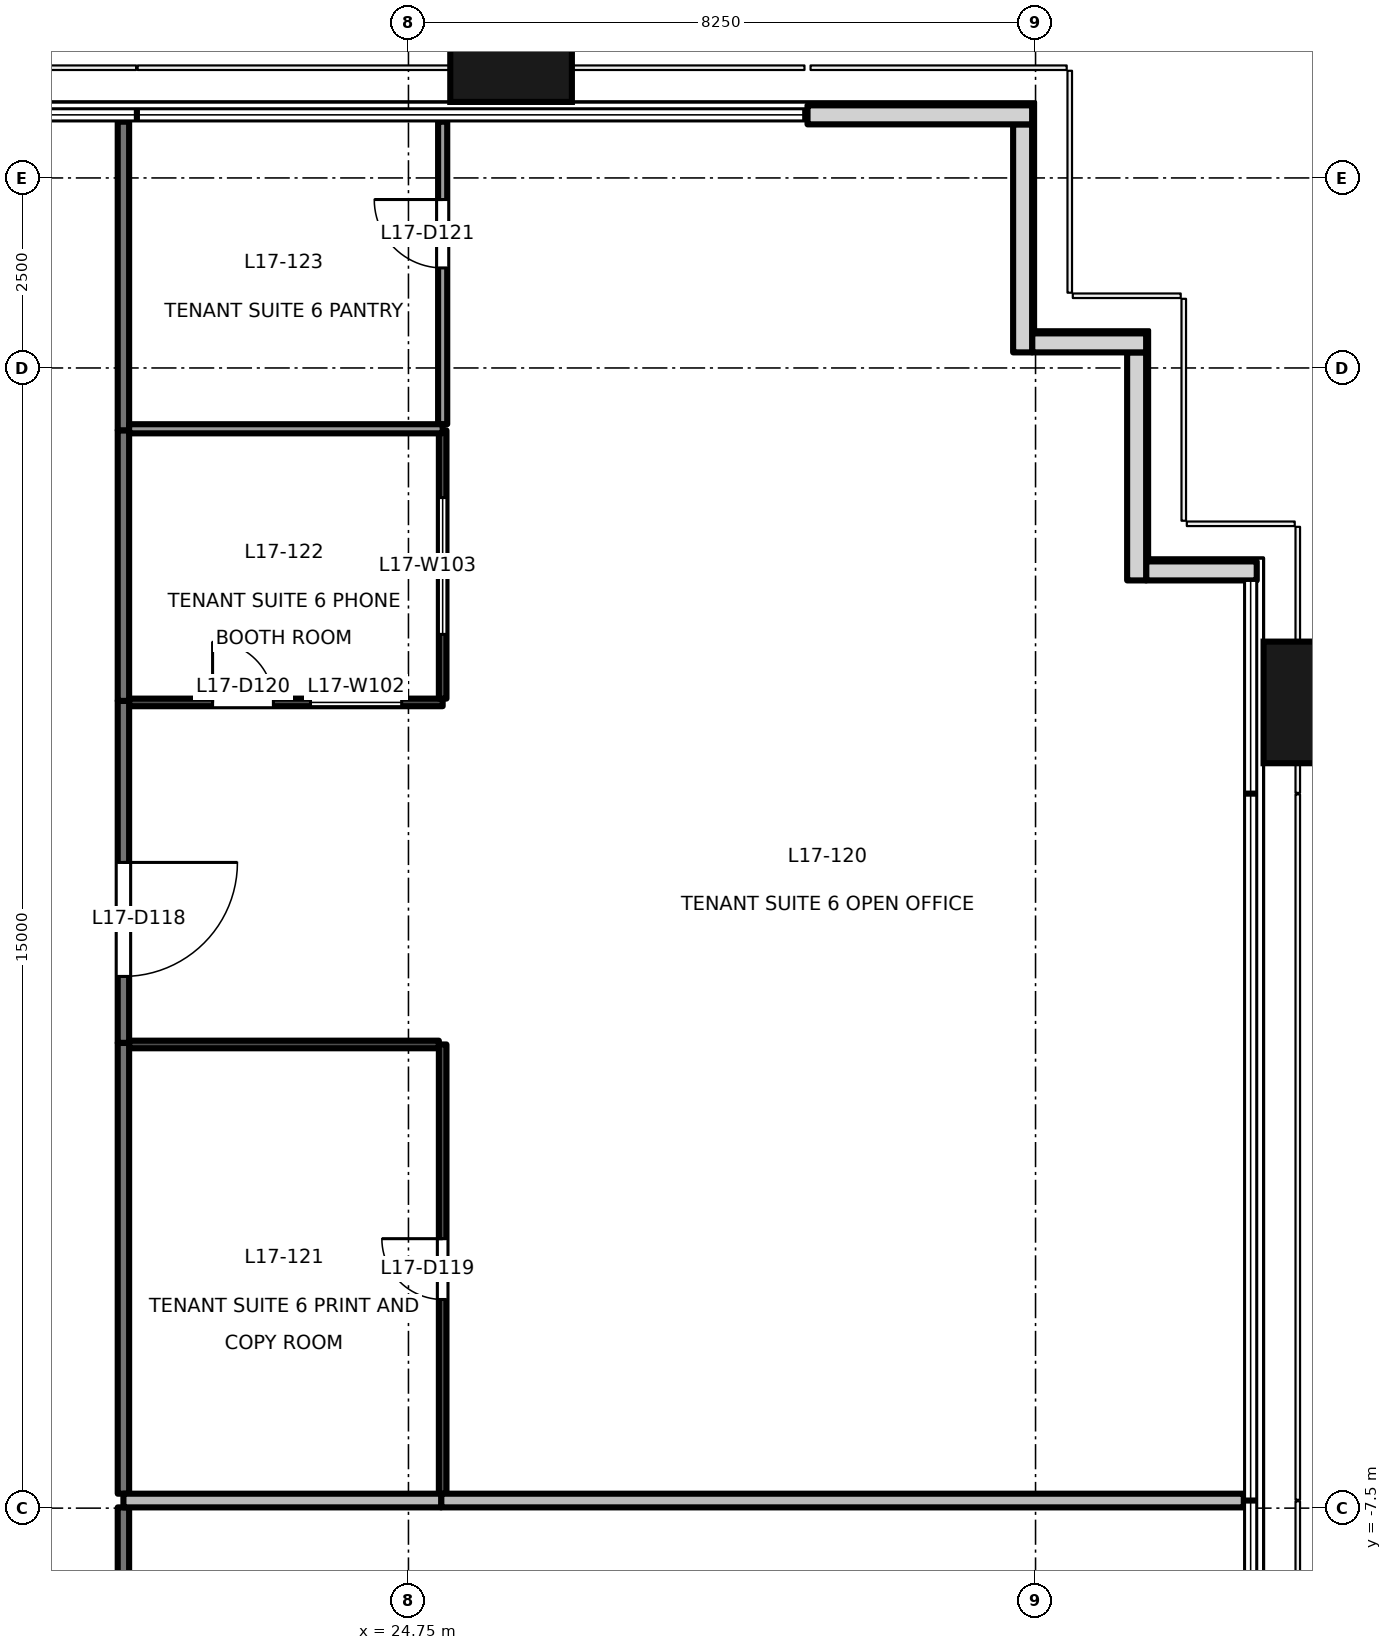
"""IFC4 building model, lengths in metres.
Left out: names, types, materials, properties, quantities, classifications, styles, units other than length and angle.
Written with IfcOpenShell. Run it as: python <this file> out.ifc"""

import sys

from ifc_helpers import new_model, si_unit, direction, frame, frame_2d, origin, origin_2d, place, context, subcontext, project, spatial, rectangle, extrude, element, fill, save


model = new_model("IFC4")
c1 = context("Model", 3, precision=1e-05, world=origin(), true_north=direction((0.0, 1.0)))
c2 = subcontext(c1, "Body", "Model", "MODEL_VIEW")
j1 = project(units=[si_unit("LENGTHUNIT", "METRE"), si_unit("PLANEANGLEUNIT", "RADIAN")], contexts=[c1])
p1 = place(None, origin())
s1 = spatial("IfcSite", under=j1, at=p1, CompositionType="ELEMENT")
p2 = place(p1, origin())
s2 = spatial("IfcBuilding", under=s1, at=p2, CompositionType="ELEMENT")
p3 = place(p2, frame((0.0, 0.0, 79.7)))
s3 = spatial("IfcBuildingStorey", under=s2, at=p3, CompositionType="ELEMENT", Elevation=79.7)
for number, where, z_axis, x_axis in (
    (1, (36.9, 3.1, -0.2), (0.0, 0.0, 1.0), (0.0, 1.0, 0.0)),
    (2, (26.1, 11.9, -0.2), (0.0, 0.0, 1.0), (1.0, 0.0, 0.0)),
):
    element("IfcColumn", number, at=place(p3, frame(where, z_axis=z_axis, x_axis=x_axis)), inside=s3, PredefinedType="COLUMN", context=c2, shape_type="SweptSolid", body=[
        extrude(rectangle(XDim=1.6, YDim=1.8, at=origin_2d()), origin(), (0.0, 0.0, 1.0), 4.0),
    ])
p4 = place(p3, frame((35.91, 4.83, 0.0), z_axis=(0.0, 0.0, 1.0), x_axis=(-1.0, 0.0, 0.0)))
e3 = element("IfcWall", 3, at=p4, inside=s3, PredefinedType="SOLIDWALL", context=c2, shape_type="SweptSolid", body=[
    extrude(rectangle(XDim=1.455, YDim=0.25, at=frame_2d((0.728, 0.0))), origin(), (0.0, 0.0, 1.0), 3.8),
])
p5 = place(p3, frame((34.33, 4.705, 0.0), z_axis=(0.0, 0.0, 1.0), x_axis=(0.0, 1.0, 0.0)))
e4 = element("IfcWall", 4, at=p5, inside=s3, PredefinedType="SOLIDWALL", context=c2, shape_type="SweptSolid", body=[
    extrude(rectangle(XDim=3.0, YDim=0.25, at=frame_2d((1.5, 0.0))), origin(), (0.0, 0.0, 1.0), 3.8),
])
p6 = place(p3, frame((34.455, 7.83, 0.0), z_axis=(0.0, 0.0, 1.0), x_axis=(-1.0, 0.0, 0.0)))
e5 = element("IfcWall", 5, at=p6, inside=s3, PredefinedType="SOLIDWALL", context=c2, shape_type="SweptSolid", body=[
    extrude(rectangle(XDim=1.5, YDim=0.25, at=frame_2d((0.75, 0.0))), origin(), (0.0, 0.0, 1.0), 3.8),
])
p7 = place(p3, frame((32.83, 7.705, 0.0), z_axis=(0.0, 0.0, 1.0), x_axis=(0.0, 1.0, 0.0)))
e6 = element("IfcWall", 6, at=p7, inside=s3, PredefinedType="SOLIDWALL", context=c2, shape_type="SweptSolid", body=[
    extrude(rectangle(XDim=3.0, YDim=0.25, at=frame_2d((1.5, 0.0))), origin(), (0.0, 0.0, 1.0), 3.8),
])
p8 = place(p3, frame((32.955, 10.83, 0.0), z_axis=(0.0, 0.0, 1.0), x_axis=(-1.0, 0.0, 0.0)))
e7 = element("IfcWall", 7, at=p8, inside=s3, PredefinedType="SOLIDWALL", context=c2, shape_type="SweptSolid", body=[
    extrude(rectangle(XDim=2.955, YDim=0.25, at=frame_2d((1.478, 0.0))), origin(), (0.0, 0.0, 1.0), 3.8),
])
p9 = place(p3, frame((21.0, -7.49, 0.0), z_axis=(0.0, 0.0, 1.0), x_axis=(0.0, -1.0, 0.0)))
e8 = element("IfcWall", 8, at=p9, inside=s3, PredefinedType="PARTITIONING", context=c2, shape_type="SweptSolid", body=[
    extrude(rectangle(XDim=3.61, YDim=0.15, at=frame_2d((1.805, 0.0))), origin(), (0.0, 0.0, 1.0), 2.9),
])
p10 = place(p9, frame((1.458, 0.0, 0.0)))
e9 = element("IfcOpeningElement", 9, at=p10, cuts=e8, PredefinedType="OPENING", context=c2, shape_type="SweptSolid", body=[
    extrude(rectangle(XDim=1.5, YDim=2.1, at=frame_2d((0.75, 1.05))), frame((0.0, 0.085, 0.0), z_axis=(0.0, -1.0, 0.0), x_axis=(1.0, 0.0, 0.0)), (0.0, 0.0, 1.0), 0.171),
])
p11 = place(p3, frame((21.0, 3.12, 0.0), z_axis=(0.0, 0.0, 1.0), x_axis=(0.0, -1.0, 0.0)))
e10 = element("IfcWall", 10, at=p11, inside=s3, PredefinedType="PARTITIONING", context=c2, shape_type="SweptSolid", body=[
    extrude(rectangle(XDim=4.5, YDim=0.15, at=frame_2d((2.25, 0.0))), origin(), (0.0, 0.0, 1.0), 2.9),
])
p12 = place(p11, frame((2.125, 0.0, 0.0)))
e11 = element("IfcOpeningElement", 11, at=p12, cuts=e10, PredefinedType="OPENING", context=c2, shape_type="SweptSolid", body=[
    extrude(rectangle(XDim=1.5, YDim=2.1, at=frame_2d((0.75, 1.05))), frame((0.0, 0.085, 0.0), z_axis=(0.0, -1.0, 0.0), x_axis=(1.0, 0.0, 0.0)), (0.0, 0.0, 1.0), 0.171),
])
p13 = place(p3, frame((21.0, -1.38, 0.0), z_axis=(0.0, 0.0, 1.0), x_axis=(0.0, -1.0, 0.0)))
e12 = element("IfcWall", 12, at=p13, inside=s3, PredefinedType="PARTITIONING", context=c2, shape_type="SweptSolid", body=[
    extrude(rectangle(XDim=5.93, YDim=0.15, at=frame_2d((2.965, 0.0))), origin(), (0.0, 0.0, 1.0), 2.9),
])
p14 = place(p3, frame((21.0, 6.68, 0.0), z_axis=(0.0, 0.0, 1.0), x_axis=(0.0, -1.0, 0.0)))
e13 = element("IfcWall", 13, at=p14, inside=s3, PredefinedType="PARTITIONING", context=c2, shape_type="SweptSolid", body=[
    extrude(rectangle(XDim=3.56, YDim=0.15, at=frame_2d((1.78, 0.0))), origin(), (0.0, 0.0, 1.0), 2.9),
])
p15 = place(p3, frame((21.0, 10.74, 0.0), z_axis=(0.0, 0.0, 1.0), x_axis=(0.0, -1.0, 0.0)))
e14 = element("IfcWall", 14, at=p15, inside=s3, PredefinedType="PARTITIONING", context=c2, shape_type="SweptSolid", body=[
    extrude(rectangle(XDim=4.06, YDim=0.15, at=frame_2d((2.03, 0.0))), origin(), (0.0, 0.0, 1.0), 3.8),
])
p16 = place(p3, frame((25.18, -7.4, 0.0), z_axis=(0.0, 0.0, 1.0), x_axis=(1.0, 0.0, 0.0)))
e15 = element("IfcWall", 15, at=p16, inside=s3, PredefinedType="PARTITIONING", context=c2, shape_type="SweptSolid", body=[
    extrude(rectangle(XDim=10.56, YDim=0.18, at=frame_2d((5.28, 0.0))), origin(), (0.0, 0.0, 1.0), 3.8),
])
p17 = place(p3, frame((21.0, -7.4, 0.0), z_axis=(0.0, 0.0, 1.0), x_axis=(1.0, 0.0, 0.0)))
e16 = element("IfcWall", 16, at=p17, inside=s3, PredefinedType="PARTITIONING", context=c2, shape_type="SweptSolid", body=[
    extrude(rectangle(XDim=4.18, YDim=0.18, at=frame_2d((2.09, 0.0))), origin(), (0.0, 0.0, 1.0), 3.8),
])
p18 = place(p3, frame((25.15, -1.4, 0.0), z_axis=(0.0, 0.0, 1.0), x_axis=(-1.0, 0.0, 0.0)))
e17 = element("IfcWall", 17, at=p18, inside=s3, PredefinedType="PARTITIONING", context=c2, shape_type="SweptSolid", body=[
    extrude(rectangle(XDim=4.075, YDim=0.1, at=frame_2d((2.038, 0.0))), origin(), (0.0, 0.0, 1.0), 3.8),
])
p19 = place(p3, frame((25.2, -7.31, 0.0), z_axis=(0.0, 0.0, 1.0), x_axis=(0.0, 1.0, 0.0)))
e18 = element("IfcWall", 18, at=p19, inside=s3, PredefinedType="PARTITIONING", context=c2, shape_type="SweptSolid", body=[
    extrude(rectangle(XDim=5.91, YDim=0.1, at=frame_2d((2.955, 0.0))), origin(), (0.0, 0.0, 1.0), 2.9),
])
p20 = place(p19, frame((2.555, 0.0, 0.0)))
e19 = element("IfcOpeningElement", 19, at=p20, cuts=e18, PredefinedType="OPENING", context=c2, shape_type="SweptSolid", body=[
    extrude(rectangle(XDim=0.8, YDim=2.1, at=frame_2d((0.4, 1.05))), frame((0.0, 0.061, 0.0), z_axis=(0.0, -1.0, 0.0), x_axis=(1.0, 0.0, 0.0)), (0.0, 0.0, 1.0), 0.121),
])
p21 = place(p3, frame((21.075, 3.1, 0.0), z_axis=(0.0, 0.0, 1.0), x_axis=(1.0, 0.0, 0.0)))
e20 = element("IfcWall", 20, at=p21, inside=s3, PredefinedType="PARTITIONING", context=c2, shape_type="SweptSolid", body=[
    extrude(rectangle(XDim=4.125, YDim=0.1, at=frame_2d((2.062, 0.0))), origin(), (0.0, 0.0, 1.0), 3.8),
])
p22 = place(p21, frame((1.098, 0.0, 0.0)))
e21 = element("IfcOpeningElement", 21, at=p22, cuts=e20, PredefinedType="OPENING", context=c2, shape_type="SweptSolid", body=[
    extrude(rectangle(XDim=0.8, YDim=2.1, at=frame_2d((0.4, 1.05))), frame((0.0, 0.061, 0.0), z_axis=(0.0, -1.0, 0.0), x_axis=(1.0, 0.0, 0.0)), (0.0, 0.0, 1.0), 0.121),
])
p23 = place(p21, frame((2.386, 0.0, 0.9)))
e22 = element("IfcOpeningElement", 22, at=p23, cuts=e20, PredefinedType="OPENING", context=c2, shape_type="SweptSolid", body=[
    extrude(rectangle(XDim=1.2, YDim=1.2, at=frame_2d((0.6, 0.6))), frame((0.0, 0.061, 0.0), z_axis=(0.0, -1.0, 0.0), x_axis=(1.0, 0.0, 0.0)), (0.0, 0.0, 1.0), 0.121),
])
p24 = place(p3, frame((25.2, 3.15, 0.0), z_axis=(0.0, 0.0, 1.0), x_axis=(0.0, 1.0, 0.0)))
e23 = element("IfcWall", 23, at=p24, inside=s3, PredefinedType="PARTITIONING", context=c2, shape_type="SweptSolid", body=[
    extrude(rectangle(XDim=3.53, YDim=0.1, at=frame_2d((1.765, 0.0))), origin(), (0.0, 0.0, 1.0), 2.9),
])
p25 = place(p24, frame((0.845, 0.0, 0.9)))
e24 = element("IfcOpeningElement", 24, at=p25, cuts=e23, PredefinedType="OPENING", context=c2, shape_type="SweptSolid", body=[
    extrude(rectangle(XDim=1.8, YDim=1.2, at=frame_2d((0.9, 0.6))), frame((0.0, 0.061, 0.0), z_axis=(0.0, -1.0, 0.0), x_axis=(1.0, 0.0, 0.0)), (0.0, 0.0, 1.0), 0.121),
])
p26 = place(p3, frame((25.2, 6.76, 0.0), z_axis=(0.0, 0.0, 1.0), x_axis=(0.0, 1.0, 0.0)))
e25 = element("IfcWall", 25, at=p26, inside=s3, PredefinedType="PARTITIONING", context=c2, shape_type="SweptSolid", body=[
    extrude(rectangle(XDim=3.98, YDim=0.12, at=frame_2d((1.99, 0.0))), origin(), (0.0, 0.0, 1.0), 3.8),
])
p27 = place(p26, frame((2.056, 0.0, 0.0)))
e26 = element("IfcOpeningElement", 26, at=p27, cuts=e25, PredefinedType="OPENING", context=c2, shape_type="SweptSolid", body=[
    extrude(rectangle(XDim=0.9, YDim=2.1, at=frame_2d((0.45, 1.05))), frame((0.0, 0.071, 0.0), z_axis=(0.0, -1.0, 0.0), x_axis=(1.0, 0.0, 0.0)), (0.0, 0.0, 1.0), 0.141),
])
p28 = place(p3, frame((21.075, 6.7, 0.0), z_axis=(0.0, 0.0, 1.0), x_axis=(1.0, 0.0, 0.0)))
e27 = element("IfcWall", 27, at=p28, inside=s3, PredefinedType="PARTITIONING", context=c2, shape_type="SweptSolid", body=[
    extrude(rectangle(XDim=4.125, YDim=0.12, at=frame_2d((2.062, 0.0))), origin(), (0.0, 0.0, 1.0), 3.8),
])
p29 = place(p12, origin())
e28 = element("IfcDoor", 28, at=p29, inside=s3, OperationType="DOUBLE_DOOR_SINGLE_SWING", PredefinedType="DOOR", context=c2, shape_type="SweptSolid", body=[
    extrude(rectangle(XDim=1.5, YDim=2.1, at=frame_2d((0.75, 1.05))), frame((0.0, 0.025, 0.0), z_axis=(0.0, -1.0, 0.0), x_axis=(1.0, 0.0, 0.0)), (0.0, 0.0, 1.0), 0.05),
])
fill(e11, e28)
p30 = place(p20, origin())
e29 = element("IfcDoor", 29, at=p30, inside=s3, OperationType="SINGLE_SWING_RIGHT", PredefinedType="DOOR", context=c2, shape_type="SweptSolid", body=[
    extrude(rectangle(XDim=0.8, YDim=2.1, at=frame_2d((0.4, 1.05))), frame((0.0, 0.025, 0.0), z_axis=(0.0, -1.0, 0.0), x_axis=(1.0, 0.0, 0.0)), (0.0, 0.0, 1.0), 0.05),
])
fill(e19, e29)
p31 = place(p22, origin())
e30 = element("IfcDoor", 30, at=p31, inside=s3, OperationType="SINGLE_SWING_LEFT", PredefinedType="DOOR", context=c2, shape_type="SweptSolid", body=[
    extrude(rectangle(XDim=0.8, YDim=2.1, at=frame_2d((0.4, 1.05))), frame((0.0, 0.025, 0.0), z_axis=(0.0, -1.0, 0.0), x_axis=(1.0, 0.0, 0.0)), (0.0, 0.0, 1.0), 0.05),
])
fill(e21, e30)
p32 = place(p27, origin())
e31 = element("IfcDoor", 31, at=p32, inside=s3, OperationType="SINGLE_SWING_RIGHT", PredefinedType="DOOR", context=c2, shape_type="SweptSolid", body=[
    extrude(rectangle(XDim=0.9, YDim=2.1, at=frame_2d((0.45, 1.05))), frame((0.0, 0.025, 0.0), z_axis=(0.0, -1.0, 0.0), x_axis=(1.0, 0.0, 0.0)), (0.0, 0.0, 1.0), 0.05),
])
fill(e26, e31)
p33 = place(p23, origin())
e32 = element("IfcWindow", 32, at=p33, inside=s3, PartitioningType="SINGLE_PANEL", PredefinedType="WINDOW", context=c2, shape_type="SweptSolid", body=[
    extrude(rectangle(XDim=1.2, YDim=1.2, at=frame_2d((0.6, 0.6))), frame((0.0, 0.03, 0.0), z_axis=(0.0, -1.0, 0.0), x_axis=(1.0, 0.0, 0.0)), (0.0, 0.0, 1.0), 0.06),
])
fill(e22, e32)
p34 = place(p25, origin())
e33 = element("IfcWindow", 33, at=p34, inside=s3, PartitioningType="SINGLE_PANEL", PredefinedType="WINDOW", context=c2, shape_type="SweptSolid", body=[
    extrude(rectangle(XDim=1.8, YDim=1.2, at=frame_2d((0.9, 0.6))), frame((0.0, 0.03, 0.0), z_axis=(0.0, -1.0, 0.0), x_axis=(1.0, 0.0, 0.0)), (0.0, 0.0, 1.0), 0.06),
])
fill(e24, e33)
save(model, sys.argv[1])
